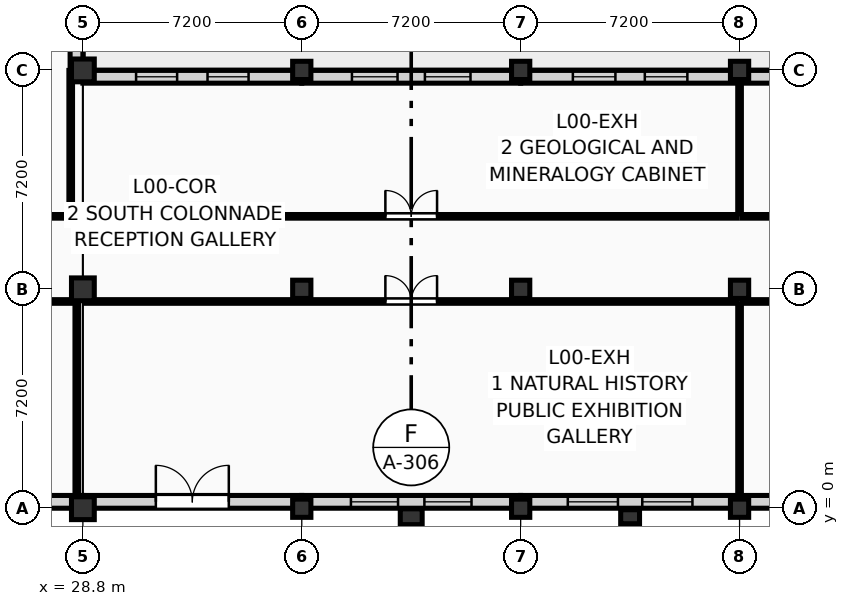
"""IFC4 building model, lengths in metres.
Left out: names, types, materials, properties, quantities, classifications, styles, units other than length and angle.
Written with IfcOpenShell. Run it as: python <this file> out.ifc"""

import sys

from ifc_helpers import new_model, si_unit, direction, frame, frame_2d, origin, origin_2d, place, context, subcontext, project, spatial, rectangle, extrude, element, fill, save


model = new_model("IFC4")
c1 = context("Model", 3, precision=1e-05, world=origin(), true_north=direction((0.0, 1.0)))
c2 = subcontext(c1, "Body", "Model", "MODEL_VIEW")
j1 = project(units=[si_unit("LENGTHUNIT", "METRE"), si_unit("PLANEANGLEUNIT", "RADIAN")], contexts=[c1])
p1 = place(None, origin())
s1 = spatial("IfcSite", under=j1, at=p1, CompositionType="ELEMENT")
p2 = place(p1, origin())
s2 = spatial("IfcBuilding", under=s1, at=p2, CompositionType="ELEMENT")
p3 = place(p2, origin())
s3 = spatial("IfcBuildingStorey", under=s2, at=p3, CompositionType="ELEMENT", Elevation=0.0)
for number, where, z_axis, x_axis in (
    (1, (28.8, 0.0, 0.0), (0.0, 0.0, 1.0), (1.0, 0.0, 0.0)),
    (2, (28.8, 7.2, 0.0), (0.0, 0.0, 1.0), (1.0, 0.0, 0.0)),
    (3, (28.8, 14.4, 0.0), (0.0, 0.0, 1.0), (1.0, 0.0, 0.0)),
):
    element("IfcColumn", number, at=place(p3, frame(where, z_axis=z_axis, x_axis=x_axis)), inside=s3, PredefinedType="COLUMN", context=c2, shape_type="SweptSolid", body=[
        extrude(rectangle(XDim=0.75, YDim=0.75, at=origin_2d()), origin(), (0.0, 0.0, 1.0), 4.5),
    ])
for number, where, z_axis, x_axis in (
    (4, (36.0, 0.0, 0.0), (0.0, 0.0, 1.0), (1.0, 0.0, 0.0)),
    (5, (36.0, 7.2, 0.0), (0.0, 0.0, 1.0), (1.0, 0.0, 0.0)),
    (6, (36.0, 14.4, 0.0), (0.0, 0.0, 1.0), (1.0, 0.0, 0.0)),
    (7, (43.2, 0.0, 0.0), (0.0, 0.0, 1.0), (1.0, 0.0, 0.0)),
    (8, (43.2, 7.2, 0.0), (0.0, 0.0, 1.0), (1.0, 0.0, 0.0)),
    (9, (43.2, 14.4, 0.0), (0.0, 0.0, 1.0), (1.0, 0.0, 0.0)),
    (10, (50.4, 0.0, 0.0), (0.0, 0.0, 1.0), (1.0, 0.0, 0.0)),
    (11, (50.4, 7.2, 0.0), (0.0, 0.0, 1.0), (1.0, 0.0, 0.0)),
    (12, (50.4, 14.4, 0.0), (0.0, 0.0, 1.0), (1.0, 0.0, 0.0)),
):
    element("IfcColumn", number, at=place(p3, frame(where, z_axis=z_axis, x_axis=x_axis)), inside=s3, PredefinedType="COLUMN", context=c2, shape_type="SweptSolid", body=[
        extrude(rectangle(XDim=0.6, YDim=0.6, at=origin_2d()), origin(), (0.0, 0.0, 1.0), 4.5),
    ])
p4 = place(p3, frame((39.6, -0.28, 0.0), z_axis=(0.0, 0.0, 1.0), x_axis=(0.0, 1.0, 0.0)))
e13 = element("IfcColumn", 13, at=p4, inside=s3, PredefinedType="PILASTER", context=c2, shape_type="SweptSolid", body=[
    extrude(rectangle(XDim=0.52, YDim=0.72, at=origin_2d()), origin(), (0.0, 0.0, 1.0), 4.5),
])
p5 = place(p3, frame((46.8, -0.28, 0.0), z_axis=(0.0, 0.0, 1.0), x_axis=(0.0, 1.0, 0.0)))
e14 = element("IfcColumn", 14, at=p5, inside=s3, PredefinedType="PILASTER", context=c2, shape_type="SweptSolid", body=[
    extrude(rectangle(XDim=0.46, YDim=0.62, at=origin_2d()), origin(), (0.0, 0.0, 1.0), 4.5),
])
p6 = place(p3, frame((50.4, 0.21, 0.0), z_axis=(0.0, 0.0, 1.0), x_axis=(1.0, 0.0, 0.0)))
e15 = element("IfcWall", 15, at=p6, inside=s3, PredefinedType="SOLIDWALL", context=c2, shape_type="SweptSolid", body=[
    extrude(rectangle(XDim=7.2, YDim=0.42, at=frame_2d((3.6, 0.0))), origin(), (0.0, 0.0, 1.0), 3.62),
])
p7 = place(p6, frame((2.6, 0.0, 0.0)))
e16 = element("IfcOpeningElement", 16, at=p7, cuts=e15, PredefinedType="OPENING", context=c2, shape_type="SweptSolid", body=[
    extrude(rectangle(XDim=2.0, YDim=2.4, at=frame_2d((1.0, 1.2))), frame((0.0, 0.222, 0.0), z_axis=(0.0, -1.0, 0.0), x_axis=(1.0, 0.0, 0.0)), (0.0, 0.0, 1.0), 0.444),
])
p8 = place(p3, frame((43.2, 0.21, 0.0), z_axis=(0.0, 0.0, 1.0), x_axis=(1.0, 0.0, 0.0)))
e17 = element("IfcWall", 17, at=p8, inside=s3, PredefinedType="SOLIDWALL", context=c2, shape_type="SweptSolid", body=[
    extrude(rectangle(XDim=7.2, YDim=0.42, at=frame_2d((3.6, 0.0))), origin(), (0.0, 0.0, 1.0), 3.62),
])
p9 = place(p8, frame((1.55, 0.0, 0.45)))
e18 = element("IfcOpeningElement", 18, at=p9, cuts=e17, PredefinedType="OPENING", context=c2, shape_type="SweptSolid", body=[
    extrude(rectangle(XDim=1.65, YDim=2.6, at=frame_2d((0.825, 1.3))), frame((0.0, 0.222, 0.0), z_axis=(0.0, -1.0, 0.0), x_axis=(1.0, 0.0, 0.0)), (0.0, 0.0, 1.0), 0.444),
])
p10 = place(p8, frame((4.0, 0.0, 0.45)))
e19 = element("IfcOpeningElement", 19, at=p10, cuts=e17, PredefinedType="OPENING", context=c2, shape_type="SweptSolid", body=[
    extrude(rectangle(XDim=1.65, YDim=2.6, at=frame_2d((0.825, 1.3))), frame((0.0, 0.222, 0.0), z_axis=(0.0, -1.0, 0.0), x_axis=(1.0, 0.0, 0.0)), (0.0, 0.0, 1.0), 0.444),
])
p11 = place(p3, frame((36.0, 0.21, 0.0), z_axis=(0.0, 0.0, 1.0), x_axis=(1.0, 0.0, 0.0)))
e20 = element("IfcWall", 20, at=p11, inside=s3, PredefinedType="SOLIDWALL", context=c2, shape_type="SweptSolid", body=[
    extrude(rectangle(XDim=7.2, YDim=0.42, at=frame_2d((3.6, 0.0))), origin(), (0.0, 0.0, 1.0), 3.62),
])
p12 = place(p11, frame((1.617, 0.0, 0.45)))
e21 = element("IfcOpeningElement", 21, at=p12, cuts=e20, PredefinedType="OPENING", context=c2, shape_type="SweptSolid", body=[
    extrude(rectangle(XDim=1.55, YDim=2.55, at=frame_2d((0.775, 1.275))), frame((0.0, 0.222, 0.0), z_axis=(0.0, -1.0, 0.0), x_axis=(1.0, 0.0, 0.0)), (0.0, 0.0, 1.0), 0.444),
])
p13 = place(p11, frame((4.033, 0.0, 0.45)))
e22 = element("IfcOpeningElement", 22, at=p13, cuts=e20, PredefinedType="OPENING", context=c2, shape_type="SweptSolid", body=[
    extrude(rectangle(XDim=1.55, YDim=2.55, at=frame_2d((0.775, 1.275))), frame((0.0, 0.222, 0.0), z_axis=(0.0, -1.0, 0.0), x_axis=(1.0, 0.0, 0.0)), (0.0, 0.0, 1.0), 0.444),
])
p14 = place(p3, frame((28.8, 0.21, 0.0), z_axis=(0.0, 0.0, 1.0), x_axis=(1.0, 0.0, 0.0)))
e23 = element("IfcWall", 23, at=p14, inside=s3, PredefinedType="SOLIDWALL", context=c2, shape_type="SweptSolid", body=[
    extrude(rectangle(XDim=7.2, YDim=0.42, at=frame_2d((3.6, 0.0))), origin(), (0.0, 0.0, 1.0), 3.62),
])
p15 = place(p14, frame((2.4, 0.0, 0.0)))
e24 = element("IfcOpeningElement", 24, at=p15, cuts=e23, PredefinedType="OPENING", context=c2, shape_type="SweptSolid", body=[
    extrude(rectangle(XDim=2.4, YDim=2.6, at=frame_2d((1.2, 1.3))), frame((0.0, 0.222, 0.0), z_axis=(0.0, -1.0, 0.0), x_axis=(1.0, 0.0, 0.0)), (0.0, 0.0, 1.0), 0.444),
])
p16 = place(p3, frame((21.6, 0.21, 0.0), z_axis=(0.0, 0.0, 1.0), x_axis=(1.0, 0.0, 0.0)))
e25 = element("IfcWall", 25, at=p16, inside=s3, PredefinedType="SOLIDWALL", context=c2, shape_type="SweptSolid", body=[
    extrude(rectangle(XDim=7.2, YDim=0.42, at=frame_2d((3.6, 0.0))), origin(), (0.0, 0.0, 1.0), 3.62),
])
p17 = place(p16, frame((2.6, 0.0, 0.0)))
e26 = element("IfcOpeningElement", 26, at=p17, cuts=e25, PredefinedType="OPENING", context=c2, shape_type="SweptSolid", body=[
    extrude(rectangle(XDim=2.0, YDim=2.4, at=frame_2d((1.0, 1.2))), frame((0.0, 0.222, 0.0), z_axis=(0.0, -1.0, 0.0), x_axis=(1.0, 0.0, 0.0)), (0.0, 0.0, 1.0), 0.444),
])
p18 = place(p3, frame((28.59, 14.4, 0.0), z_axis=(0.0, 0.0, 1.0), x_axis=(0.0, 1.0, 0.0)))
e27 = element("IfcWall", 27, at=p18, inside=s3, PredefinedType="SOLIDWALL", context=c2, shape_type="SweptSolid", body=[
    extrude(rectangle(XDim=7.2, YDim=0.42, at=frame_2d((3.6, 0.0))), origin(), (0.0, 0.0, 1.0), 3.62),
])
p19 = place(p18, frame((0.962, 0.0, 0.18)))
e28 = element("IfcOpeningElement", 28, at=p19, cuts=e27, PredefinedType="OPENING", context=c2, shape_type="SweptSolid", body=[
    extrude(rectangle(XDim=1.55, YDim=3.25, at=frame_2d((0.775, 1.625))), frame((0.0, 0.222, 0.0), z_axis=(0.0, -1.0, 0.0), x_axis=(1.0, 0.0, 0.0)), (0.0, 0.0, 1.0), 0.444),
])
p20 = place(p18, frame((2.825, 0.0, 0.18)))
e29 = element("IfcOpeningElement", 29, at=p20, cuts=e27, PredefinedType="OPENING", context=c2, shape_type="SweptSolid", body=[
    extrude(rectangle(XDim=1.55, YDim=3.25, at=frame_2d((0.775, 1.625))), frame((0.0, 0.222, 0.0), z_axis=(0.0, -1.0, 0.0), x_axis=(1.0, 0.0, 0.0)), (0.0, 0.0, 1.0), 0.444),
])
p21 = place(p18, frame((4.688, 0.0, 0.18)))
e30 = element("IfcOpeningElement", 30, at=p21, cuts=e27, PredefinedType="OPENING", context=c2, shape_type="SweptSolid", body=[
    extrude(rectangle(XDim=1.55, YDim=3.25, at=frame_2d((0.775, 1.625))), frame((0.0, 0.222, 0.0), z_axis=(0.0, -1.0, 0.0), x_axis=(1.0, 0.0, 0.0)), (0.0, 0.0, 1.0), 0.444),
])
p22 = place(p3, frame((28.8, 14.19, 0.0), z_axis=(0.0, 0.0, 1.0), x_axis=(1.0, 0.0, 0.0)))
e31 = element("IfcWall", 31, at=p22, inside=s3, PredefinedType="SOLIDWALL", context=c2, shape_type="SweptSolid", body=[
    extrude(rectangle(XDim=7.2, YDim=0.42, at=frame_2d((3.6, 0.0))), origin(), (0.0, 0.0, 1.0), 3.62),
])
p23 = place(p22, frame((1.75, 0.0, 0.45)))
e32 = element("IfcOpeningElement", 32, at=p23, cuts=e31, PredefinedType="OPENING", context=c2, shape_type="SweptSolid", body=[
    extrude(rectangle(XDim=1.35, YDim=2.45, at=frame_2d((0.675, 1.225))), frame((0.0, 0.222, 0.0), z_axis=(0.0, -1.0, 0.0), x_axis=(1.0, 0.0, 0.0)), (0.0, 0.0, 1.0), 0.444),
])
p24 = place(p22, frame((4.1, 0.0, 0.45)))
e33 = element("IfcOpeningElement", 33, at=p24, cuts=e31, PredefinedType="OPENING", context=c2, shape_type="SweptSolid", body=[
    extrude(rectangle(XDim=1.35, YDim=2.45, at=frame_2d((0.675, 1.225))), frame((0.0, 0.222, 0.0), z_axis=(0.0, -1.0, 0.0), x_axis=(1.0, 0.0, 0.0)), (0.0, 0.0, 1.0), 0.444),
])
p25 = place(p3, frame((36.0, 14.19, 0.0), z_axis=(0.0, 0.0, 1.0), x_axis=(1.0, 0.0, 0.0)))
e34 = element("IfcWall", 34, at=p25, inside=s3, PredefinedType="SOLIDWALL", context=c2, shape_type="SweptSolid", body=[
    extrude(rectangle(XDim=7.2, YDim=0.42, at=frame_2d((3.6, 0.0))), origin(), (0.0, 0.0, 1.0), 3.62),
])
p26 = place(p25, frame((1.65, 0.0, 0.45)))
e35 = element("IfcOpeningElement", 35, at=p26, cuts=e34, PredefinedType="OPENING", context=c2, shape_type="SweptSolid", body=[
    extrude(rectangle(XDim=1.5, YDim=2.4, at=frame_2d((0.75, 1.2))), frame((0.0, 0.222, 0.0), z_axis=(0.0, -1.0, 0.0), x_axis=(1.0, 0.0, 0.0)), (0.0, 0.0, 1.0), 0.444),
])
p27 = place(p25, frame((4.05, 0.0, 0.45)))
e36 = element("IfcOpeningElement", 36, at=p27, cuts=e34, PredefinedType="OPENING", context=c2, shape_type="SweptSolid", body=[
    extrude(rectangle(XDim=1.5, YDim=2.4, at=frame_2d((0.75, 1.2))), frame((0.0, 0.222, 0.0), z_axis=(0.0, -1.0, 0.0), x_axis=(1.0, 0.0, 0.0)), (0.0, 0.0, 1.0), 0.444),
])
p28 = place(p3, frame((43.2, 14.19, 0.0), z_axis=(0.0, 0.0, 1.0), x_axis=(1.0, 0.0, 0.0)))
e37 = element("IfcWall", 37, at=p28, inside=s3, PredefinedType="SOLIDWALL", context=c2, shape_type="SweptSolid", body=[
    extrude(rectangle(XDim=7.2, YDim=0.42, at=frame_2d((3.6, 0.0))), origin(), (0.0, 0.0, 1.0), 3.62),
])
p29 = place(p28, frame((1.717, 0.0, 0.45)))
e38 = element("IfcOpeningElement", 38, at=p29, cuts=e37, PredefinedType="OPENING", context=c2, shape_type="SweptSolid", body=[
    extrude(rectangle(XDim=1.4, YDim=2.38, at=frame_2d((0.7, 1.19))), frame((0.0, 0.222, 0.0), z_axis=(0.0, -1.0, 0.0), x_axis=(1.0, 0.0, 0.0)), (0.0, 0.0, 1.0), 0.444),
])
p30 = place(p28, frame((4.083, 0.0, 0.45)))
e39 = element("IfcOpeningElement", 39, at=p30, cuts=e37, PredefinedType="OPENING", context=c2, shape_type="SweptSolid", body=[
    extrude(rectangle(XDim=1.4, YDim=2.38, at=frame_2d((0.7, 1.19))), frame((0.0, 0.222, 0.0), z_axis=(0.0, -1.0, 0.0), x_axis=(1.0, 0.0, 0.0)), (0.0, 0.0, 1.0), 0.444),
])
p31 = place(p3, frame((50.4, 14.19, 0.0), z_axis=(0.0, 0.0, 1.0), x_axis=(1.0, 0.0, 0.0)))
e40 = element("IfcWall", 40, at=p31, inside=s3, PredefinedType="SOLIDWALL", context=c2, shape_type="SweptSolid", body=[
    extrude(rectangle(XDim=7.2, YDim=0.42, at=frame_2d((3.6, 0.0))), origin(), (0.0, 0.0, 1.0), 3.62),
])
p32 = place(p31, frame((2.4, 0.0, 0.0)))
e41 = element("IfcOpeningElement", 41, at=p32, cuts=e40, PredefinedType="OPENING", context=c2, shape_type="SweptSolid", body=[
    extrude(rectangle(XDim=2.4, YDim=2.6, at=frame_2d((1.2, 1.3))), frame((0.0, 0.222, 0.0), z_axis=(0.0, -1.0, 0.0), x_axis=(1.0, 0.0, 0.0)), (0.0, 0.0, 1.0), 0.444),
])
p33 = place(p3, frame((28.6, 0.48, 0.0), z_axis=(0.0, 0.0, 1.0), x_axis=(0.0, 1.0, 0.0)))
e42 = element("IfcWall", 42, at=p33, inside=s3, PredefinedType="PARTITIONING", context=c2, shape_type="SweptSolid", body=[
    extrude(rectangle(XDim=6.24, YDim=0.12, at=frame_2d((3.12, 0.0))), origin(), (0.0, 0.0, 1.0), 3.385),
])
p34 = place(p3, frame((14.88, 6.8, 0.0), z_axis=(0.0, 0.0, 1.0), x_axis=(1.0, 0.0, 0.0)))
e43 = element("IfcWall", 43, at=p34, inside=s3, PredefinedType="PARTITIONING", context=c2, shape_type="SweptSolid", body=[
    extrude(rectangle(XDim=13.64, YDim=0.12, at=frame_2d((6.82, 0.0))), origin(), (0.0, 0.0, 1.0), 3.485),
])
p35 = place(p34, frame((8.826, 0.0, 0.0)))
e44 = element("IfcOpeningElement", 44, at=p35, cuts=e43, PredefinedType="OPENING", context=c2, shape_type="SweptSolid", body=[
    extrude(rectangle(XDim=1.05, YDim=2.18, at=frame_2d((0.525, 1.09))), frame((0.0, 0.072, 0.0), z_axis=(0.0, -1.0, 0.0), x_axis=(1.0, 0.0, 0.0)), (0.0, 0.0, 1.0), 0.144),
])
p36 = place(p3, frame((20.48, 9.6, 0.0), z_axis=(0.0, 0.0, 1.0), x_axis=(1.0, 0.0, 0.0)))
e45 = element("IfcWall", 45, at=p36, inside=s3, PredefinedType="PARTITIONING", context=c2, shape_type="SweptSolid", body=[
    extrude(rectangle(XDim=7.84, YDim=0.12, at=frame_2d((3.92, 0.0))), origin(), (0.0, 0.0, 1.0), 4.235),
])
p37 = place(p36, frame((3.29, 0.0, 0.0)))
e46 = element("IfcOpeningElement", 46, at=p37, cuts=e45, PredefinedType="OPENING", context=c2, shape_type="SweptSolid", body=[
    extrude(rectangle(XDim=1.26, YDim=2.18, at=frame_2d((0.63, 1.09))), frame((0.0, 0.072, 0.0), z_axis=(0.0, -1.0, 0.0), x_axis=(1.0, 0.0, 0.0)), (0.0, 0.0, 1.0), 0.144),
])
p38 = place(p3, frame((28.4, 9.68, 0.0), z_axis=(0.0, 0.0, 1.0), x_axis=(0.0, 1.0, 0.0)))
e47 = element("IfcWall", 47, at=p38, inside=s3, PredefinedType="PARTITIONING", context=c2, shape_type="SweptSolid", body=[
    extrude(rectangle(XDim=4.72, YDim=0.12, at=frame_2d((2.36, 0.0))), origin(), (0.0, 0.0, 1.0), 3.385),
])
p39 = place(p3, frame((50.4, 0.48, 0.0), z_axis=(0.0, 0.0, 1.0), x_axis=(0.0, 1.0, 0.0)))
e48 = element("IfcWall", 48, at=p39, inside=s3, PredefinedType="PARTITIONING", context=c2, shape_type="SweptSolid", body=[
    extrude(rectangle(XDim=6.24, YDim=0.12, at=frame_2d((3.12, 0.0))), origin(), (0.0, 0.0, 1.0), 3.385),
])
p40 = place(p3, frame((28.88, 6.8, 0.0), z_axis=(0.0, 0.0, 1.0), x_axis=(1.0, 0.0, 0.0)))
e49 = element("IfcWall", 49, at=p40, inside=s3, PredefinedType="PARTITIONING", context=c2, shape_type="SweptSolid", body=[
    extrude(rectangle(XDim=21.44, YDim=0.12, at=frame_2d((10.72, 0.0))), origin(), (0.0, 0.0, 1.0), 3.485),
])
p41 = place(p40, frame((9.87, 0.0, 0.0)))
e50 = element("IfcOpeningElement", 50, at=p41, cuts=e49, PredefinedType="OPENING", context=c2, shape_type="SweptSolid", body=[
    extrude(rectangle(XDim=1.7, YDim=2.28, at=frame_2d((0.85, 1.14))), frame((0.0, 0.072, 0.0), z_axis=(0.0, -1.0, 0.0), x_axis=(1.0, 0.0, 0.0)), (0.0, 0.0, 1.0), 0.144),
])
p42 = place(p3, frame((28.88, 9.6, 0.0), z_axis=(0.0, 0.0, 1.0), x_axis=(1.0, 0.0, 0.0)))
e51 = element("IfcWall", 51, at=p42, inside=s3, PredefinedType="PARTITIONING", context=c2, shape_type="SweptSolid", body=[
    extrude(rectangle(XDim=21.44, YDim=0.12, at=frame_2d((10.72, 0.0))), origin(), (0.0, 0.0, 1.0), 4.235),
])
p43 = place(p42, frame((9.87, 0.0, 0.0)))
e52 = element("IfcOpeningElement", 52, at=p43, cuts=e51, PredefinedType="OPENING", context=c2, shape_type="SweptSolid", body=[
    extrude(rectangle(XDim=1.7, YDim=2.28, at=frame_2d((0.85, 1.14))), frame((0.0, 0.072, 0.0), z_axis=(0.0, -1.0, 0.0), x_axis=(1.0, 0.0, 0.0)), (0.0, 0.0, 1.0), 0.144),
])
p44 = place(p3, frame((50.4, 9.68, 0.0), z_axis=(0.0, 0.0, 1.0), x_axis=(0.0, 1.0, 0.0)))
e53 = element("IfcWall", 53, at=p44, inside=s3, PredefinedType="PARTITIONING", context=c2, shape_type="SweptSolid", body=[
    extrude(rectangle(XDim=4.24, YDim=0.12, at=frame_2d((2.12, 0.0))), origin(), (0.0, 0.0, 1.0), 3.385),
])
p45 = place(p3, frame((50.48, 6.8, 0.0), z_axis=(0.0, 0.0, 1.0), x_axis=(1.0, 0.0, 0.0)))
e54 = element("IfcWall", 54, at=p45, inside=s3, PredefinedType="PARTITIONING", context=c2, shape_type="SweptSolid", body=[
    extrude(rectangle(XDim=13.84, YDim=0.12, at=frame_2d((6.92, 0.0))), origin(), (0.0, 0.0, 1.0), 3.485),
])
p46 = place(p45, frame((3.633, 0.0, 0.0)))
e55 = element("IfcOpeningElement", 55, at=p46, cuts=e54, PredefinedType="OPENING", context=c2, shape_type="SweptSolid", body=[
    extrude(rectangle(XDim=1.7, YDim=2.28, at=frame_2d((0.85, 1.14))), frame((0.0, 0.072, 0.0), z_axis=(0.0, -1.0, 0.0), x_axis=(1.0, 0.0, 0.0)), (0.0, 0.0, 1.0), 0.144),
])
p47 = place(p3, frame((50.48, 9.6, 0.0), z_axis=(0.0, 0.0, 1.0), x_axis=(1.0, 0.0, 0.0)))
e56 = element("IfcWall", 56, at=p47, inside=s3, PredefinedType="PARTITIONING", context=c2, shape_type="SweptSolid", body=[
    extrude(rectangle(XDim=13.84, YDim=0.12, at=frame_2d((6.92, 0.0))), origin(), (0.0, 0.0, 1.0), 4.235),
])
p48 = place(p47, frame((5.095, 0.0, 0.0)))
e57 = element("IfcOpeningElement", 57, at=p48, cuts=e56, PredefinedType="OPENING", context=c2, shape_type="SweptSolid", body=[
    extrude(rectangle(XDim=1.7, YDim=2.28, at=frame_2d((0.85, 1.14))), frame((0.0, 0.072, 0.0), z_axis=(0.0, -1.0, 0.0), x_axis=(1.0, 0.0, 0.0)), (0.0, 0.0, 1.0), 0.144),
])
p49 = place(p9, origin())
e58 = element("IfcWindow", 58, at=p49, inside=s3, PartitioningType="SINGLE_PANEL", PredefinedType="WINDOW", context=c2, shape_type="SweptSolid", body=[
    extrude(rectangle(XDim=1.65, YDim=2.6, at=frame_2d((0.825, 1.3))), frame((0.0, 0.03, 0.0), z_axis=(0.0, -1.0, 0.0), x_axis=(1.0, 0.0, 0.0)), (0.0, 0.0, 1.0), 0.06),
])
fill(e18, e58)
p50 = place(p10, origin())
e59 = element("IfcWindow", 59, at=p50, inside=s3, PartitioningType="SINGLE_PANEL", PredefinedType="WINDOW", context=c2, shape_type="SweptSolid", body=[
    extrude(rectangle(XDim=1.65, YDim=2.6, at=frame_2d((0.825, 1.3))), frame((0.0, 0.03, 0.0), z_axis=(0.0, -1.0, 0.0), x_axis=(1.0, 0.0, 0.0)), (0.0, 0.0, 1.0), 0.06),
])
fill(e19, e59)
p51 = place(p12, origin())
e60 = element("IfcWindow", 60, at=p51, inside=s3, PartitioningType="SINGLE_PANEL", PredefinedType="WINDOW", context=c2, shape_type="SweptSolid", body=[
    extrude(rectangle(XDim=1.55, YDim=2.55, at=frame_2d((0.775, 1.275))), frame((0.0, 0.03, 0.0), z_axis=(0.0, -1.0, 0.0), x_axis=(1.0, 0.0, 0.0)), (0.0, 0.0, 1.0), 0.06),
])
fill(e21, e60)
p52 = place(p13, origin())
e61 = element("IfcWindow", 61, at=p52, inside=s3, PartitioningType="SINGLE_PANEL", PredefinedType="WINDOW", context=c2, shape_type="SweptSolid", body=[
    extrude(rectangle(XDim=1.55, YDim=2.55, at=frame_2d((0.775, 1.275))), frame((0.0, 0.03, 0.0), z_axis=(0.0, -1.0, 0.0), x_axis=(1.0, 0.0, 0.0)), (0.0, 0.0, 1.0), 0.06),
])
fill(e22, e61)
p53 = place(p15, origin())
e62 = element("IfcDoor", 62, at=p53, inside=s3, OperationType="DOUBLE_DOOR_SINGLE_SWING", PredefinedType="DOOR", context=c2, shape_type="SweptSolid", body=[
    extrude(rectangle(XDim=2.4, YDim=2.6, at=frame_2d((1.2, 1.3))), frame((0.0, 0.025, 0.0), z_axis=(0.0, -1.0, 0.0), x_axis=(1.0, 0.0, 0.0)), (0.0, 0.0, 1.0), 0.05),
])
fill(e24, e62)
p54 = place(p23, origin())
e63 = element("IfcWindow", 63, at=p54, inside=s3, PartitioningType="SINGLE_PANEL", PredefinedType="WINDOW", context=c2, shape_type="SweptSolid", body=[
    extrude(rectangle(XDim=1.35, YDim=2.45, at=frame_2d((0.675, 1.225))), frame((0.0, 0.03, 0.0), z_axis=(0.0, -1.0, 0.0), x_axis=(1.0, 0.0, 0.0)), (0.0, 0.0, 1.0), 0.06),
])
fill(e32, e63)
p55 = place(p24, origin())
e64 = element("IfcWindow", 64, at=p55, inside=s3, PartitioningType="SINGLE_PANEL", PredefinedType="WINDOW", context=c2, shape_type="SweptSolid", body=[
    extrude(rectangle(XDim=1.35, YDim=2.45, at=frame_2d((0.675, 1.225))), frame((0.0, 0.03, 0.0), z_axis=(0.0, -1.0, 0.0), x_axis=(1.0, 0.0, 0.0)), (0.0, 0.0, 1.0), 0.06),
])
fill(e33, e64)
p56 = place(p26, origin())
e65 = element("IfcWindow", 65, at=p56, inside=s3, PartitioningType="SINGLE_PANEL", PredefinedType="WINDOW", context=c2, shape_type="SweptSolid", body=[
    extrude(rectangle(XDim=1.5, YDim=2.4, at=frame_2d((0.75, 1.2))), frame((0.0, 0.03, 0.0), z_axis=(0.0, -1.0, 0.0), x_axis=(1.0, 0.0, 0.0)), (0.0, 0.0, 1.0), 0.06),
])
fill(e35, e65)
p57 = place(p27, origin())
e66 = element("IfcWindow", 66, at=p57, inside=s3, PartitioningType="SINGLE_PANEL", PredefinedType="WINDOW", context=c2, shape_type="SweptSolid", body=[
    extrude(rectangle(XDim=1.5, YDim=2.4, at=frame_2d((0.75, 1.2))), frame((0.0, 0.03, 0.0), z_axis=(0.0, -1.0, 0.0), x_axis=(1.0, 0.0, 0.0)), (0.0, 0.0, 1.0), 0.06),
])
fill(e36, e66)
p58 = place(p29, origin())
e67 = element("IfcWindow", 67, at=p58, inside=s3, PartitioningType="SINGLE_PANEL", PredefinedType="WINDOW", context=c2, shape_type="SweptSolid", body=[
    extrude(rectangle(XDim=1.4, YDim=2.38, at=frame_2d((0.7, 1.19))), frame((0.0, 0.03, 0.0), z_axis=(0.0, -1.0, 0.0), x_axis=(1.0, 0.0, 0.0)), (0.0, 0.0, 1.0), 0.06),
])
fill(e38, e67)
p59 = place(p30, origin())
e68 = element("IfcWindow", 68, at=p59, inside=s3, PartitioningType="SINGLE_PANEL", PredefinedType="WINDOW", context=c2, shape_type="SweptSolid", body=[
    extrude(rectangle(XDim=1.4, YDim=2.38, at=frame_2d((0.7, 1.19))), frame((0.0, 0.03, 0.0), z_axis=(0.0, -1.0, 0.0), x_axis=(1.0, 0.0, 0.0)), (0.0, 0.0, 1.0), 0.06),
])
fill(e39, e68)
p60 = place(p41, origin())
e69 = element("IfcDoor", 69, at=p60, inside=s3, OperationType="DOUBLE_DOOR_SINGLE_SWING", PredefinedType="DOOR", context=c2, shape_type="SweptSolid", body=[
    extrude(rectangle(XDim=1.7, YDim=2.28, at=frame_2d((0.85, 1.14))), frame((0.0, 0.025, 0.0), z_axis=(0.0, -1.0, 0.0), x_axis=(1.0, 0.0, 0.0)), (0.0, 0.0, 1.0), 0.05),
])
fill(e50, e69)
p61 = place(p43, origin())
e70 = element("IfcDoor", 70, at=p61, inside=s3, OperationType="DOUBLE_DOOR_SINGLE_SWING", PredefinedType="DOOR", context=c2, shape_type="SweptSolid", body=[
    extrude(rectangle(XDim=1.7, YDim=2.28, at=frame_2d((0.85, 1.14))), frame((0.0, 0.025, 0.0), z_axis=(0.0, -1.0, 0.0), x_axis=(1.0, 0.0, 0.0)), (0.0, 0.0, 1.0), 0.05),
])
fill(e52, e70)
save(model, sys.argv[1])
